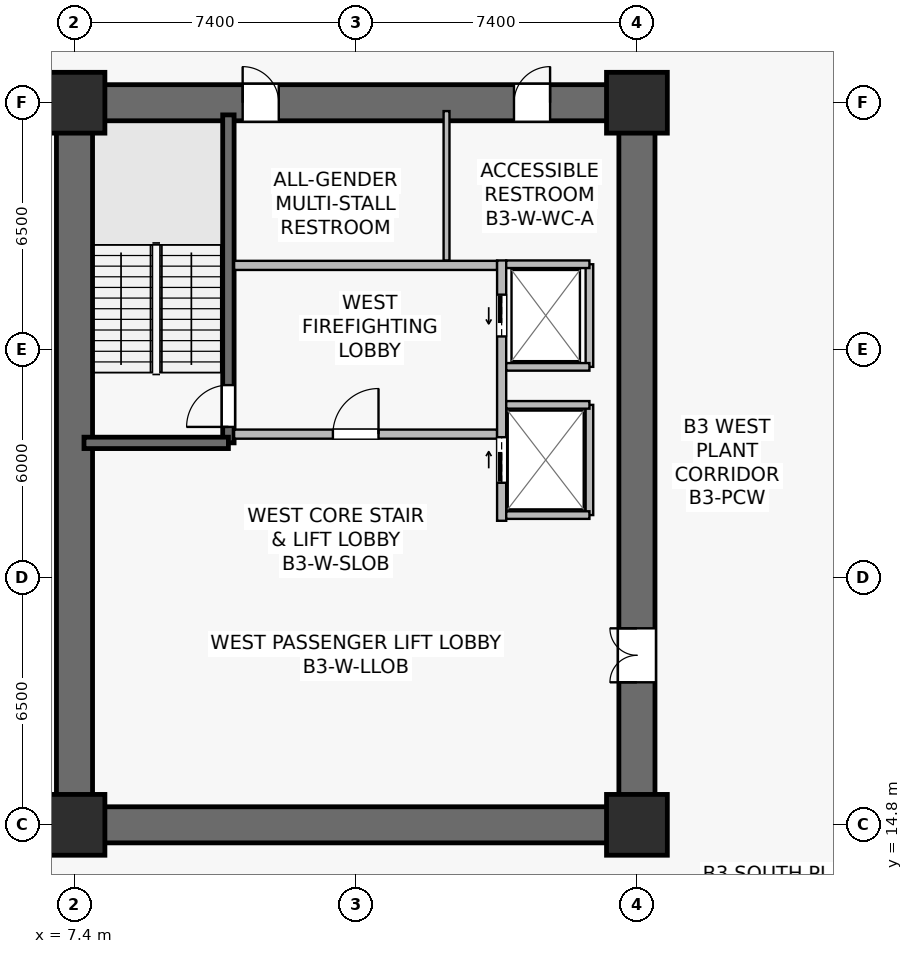
"""IFC4 building model, lengths in metres.
Left out: names, types, materials, properties, quantities, classifications, styles, units other than length and angle.
Written with IfcOpenShell. Run it as: python <this file> out.ifc"""

import sys

from ifc_helpers import new_model, si_unit, direction, frame, frame_2d, origin, origin_2d, place, context, subcontext, project, spatial, rectangle, extrude, source, transform, mapped, element, fill, save


model = new_model("IFC4")
c1 = context("Model", 3, precision=1e-05, world=origin(), true_north=direction((0.0, 1.0)))
c2 = subcontext(c1, "Body", "Model", "MODEL_VIEW")
j1 = project(units=[si_unit("LENGTHUNIT", "METRE"), si_unit("PLANEANGLEUNIT", "RADIAN")], contexts=[c1])
p1 = place(None, origin())
s1 = spatial("IfcSite", under=j1, at=p1, CompositionType="ELEMENT")
p2 = place(p1, origin())
s2 = spatial("IfcBuilding", under=s1, at=p2, CompositionType="ELEMENT")
p3 = place(p2, frame((0.0, 0.0, -14.4)))
s3 = spatial("IfcBuildingStorey", under=s2, at=p3, CompositionType="ELEMENT", Elevation=-14.4)
p4 = place(p3, frame((6.925, 14.8, 0.0), z_axis=(0.0, 0.0, 1.0), x_axis=(1.0, 0.0, 0.0)))
e1 = element("IfcWall", 1, at=p4, inside=s3, PredefinedType="SHEAR", context=c2, shape_type="SweptSolid", body=[
    extrude(rectangle(XDim=15.75, YDim=0.95, at=frame_2d((7.875, 0.0))), origin(), (0.0, 0.0, 1.0), 4.42),
])
p5 = place(p3, frame((6.925, 33.8, 0.0), z_axis=(0.0, 0.0, 1.0), x_axis=(1.0, 0.0, 0.0)))
e2 = element("IfcWall", 2, at=p5, inside=s3, PredefinedType="SHEAR", context=c2, shape_type="SweptSolid", body=[
    extrude(rectangle(XDim=15.75, YDim=0.95, at=frame_2d((7.875, 0.0))), origin(), (0.0, 0.0, 1.0), 4.42),
])
p6 = place(p5, frame((4.9, 0.0, 0.0)))
e3 = element("IfcOpeningElement", 3, at=p6, cuts=e2, PredefinedType="OPENING", context=c2, shape_type="SweptSolid", body=[
    extrude(rectangle(XDim=0.95, YDim=2.15, at=frame_2d((0.475, 1.075))), frame((0.0, 0.485, 0.0), z_axis=(0.0, -1.0, 0.0), x_axis=(1.0, 0.0, 0.0)), (0.0, 0.0, 1.0), 0.97),
])
p7 = place(p5, frame((12.04, 0.0, 0.0)))
e4 = element("IfcOpeningElement", 4, at=p7, cuts=e2, PredefinedType="OPENING", context=c2, shape_type="SweptSolid", body=[
    extrude(rectangle(XDim=0.95, YDim=2.15, at=frame_2d((0.475, 1.075))), frame((0.0, 0.485, 0.0), z_axis=(0.0, -1.0, 0.0), x_axis=(1.0, 0.0, 0.0)), (0.0, 0.0, 1.0), 0.97),
])
p8 = place(p3, frame((7.4, 15.275, 0.0), z_axis=(0.0, 0.0, 1.0), x_axis=(0.0, 1.0, 0.0)))
e5 = element("IfcWall", 5, at=p8, inside=s3, PredefinedType="SHEAR", context=c2, shape_type="SweptSolid", body=[
    extrude(rectangle(XDim=18.05, YDim=0.95, at=frame_2d((9.025, 0.0))), origin(), (0.0, 0.0, 1.0), 4.42),
])
p9 = place(p3, frame((22.2, 15.275, 0.0), z_axis=(0.0, 0.0, 1.0), x_axis=(0.0, 1.0, 0.0)))
e6 = element("IfcWall", 6, at=p9, inside=s3, PredefinedType="SHEAR", context=c2, shape_type="SweptSolid", body=[
    extrude(rectangle(XDim=18.05, YDim=0.95, at=frame_2d((9.025, 0.0))), origin(), (0.0, 0.0, 1.0), 4.42),
])
p10 = place(p9, frame((3.275, 0.0, 0.0)))
e7 = element("IfcOpeningElement", 7, at=p10, cuts=e6, PredefinedType="OPENING", context=c2, shape_type="SweptSolid", body=[
    extrude(rectangle(XDim=1.42, YDim=2.2, at=frame_2d((0.71, 1.1))), frame((0.0, 0.485, 0.0), z_axis=(0.0, -1.0, 0.0), x_axis=(1.0, 0.0, 0.0)), (0.0, 0.0, 1.0), 0.97),
])
p11 = place(p3, frame((11.45, 24.85, 0.0), z_axis=(0.0, 0.0, 1.0), x_axis=(0.0, 1.0, 0.0)))
e8 = element("IfcWall", 8, at=p11, inside=s3, PredefinedType="SHEAR", context=c2, shape_type="SweptSolid", body=[
    extrude(rectangle(XDim=8.63, YDim=0.3, at=frame_2d((4.315, 0.0))), origin(), (0.0, 0.0, 1.0), 4.42),
])
p12 = place(p11, frame((0.42, 0.0, 0.0)))
e9 = element("IfcOpeningElement", 9, at=p12, cuts=e8, PredefinedType="OPENING", context=c2, shape_type="SweptSolid", body=[
    extrude(rectangle(XDim=1.1, YDim=2.15, at=frame_2d((0.55, 1.075))), frame((0.0, 0.16, 0.0), z_axis=(0.0, -1.0, 0.0), x_axis=(1.0, 0.0, 0.0)), (0.0, 0.0, 1.0), 0.32),
])
p13 = place(p3, frame((7.65, 24.85, 0.0), z_axis=(0.0, 0.0, 1.0), x_axis=(1.0, 0.0, 0.0)))
e10 = element("IfcWall", 10, at=p13, inside=s3, PredefinedType="SHEAR", context=c2, shape_type="SweptSolid", body=[
    extrude(rectangle(XDim=3.8, YDim=0.3, at=frame_2d((1.9, 0.0))), origin(), (0.0, 0.0, 1.0), 4.42),
])
m1 = source(origin(), c2, "Body", "SweptSolid", [
    extrude(rectangle(XDim=1.6, YDim=1.6, at=origin_2d()), origin(), (0.0, 0.0, 1.0), 4.8),
])
for number, where, z_axis, x_axis in (
    (11, (7.4, 14.8, 0.0), (0.0, 0.0, 1.0), (1.0, 0.0, 0.0)),
    (12, (22.2, 14.8, 0.0), (0.0, 0.0, 1.0), (1.0, 0.0, 0.0)),
    (13, (7.4, 33.8, 0.0), (0.0, 0.0, 1.0), (1.0, 0.0, 0.0)),
    (14, (22.2, 33.8, 0.0), (0.0, 0.0, 1.0), (1.0, 0.0, 0.0)),
):
    element("IfcColumn", number, at=place(p3, frame(where, z_axis=z_axis, x_axis=x_axis)), inside=s3, PredefinedType="COLUMN", context=c2, shape_type="MappedRepresentation", body=[
        mapped(m1, transform((0.0, 0.0, 0.0), scale=1.0)),
    ])
p14 = place(p3, frame((11.6, 25.08, 0.0), z_axis=(0.0, 0.0, 1.0), x_axis=(1.0, 0.0, 0.0)))
e15 = element("IfcWall", 15, at=p14, inside=s3, PredefinedType="SOLIDWALL", context=c2, shape_type="SweptSolid", body=[
    extrude(rectangle(XDim=6.92, YDim=0.24, at=frame_2d((3.46, 0.0))), origin(), (0.0, 0.0, 1.0), 3.655),
])
p15 = place(p14, frame((2.6, 0.0, 0.0)))
e16 = element("IfcOpeningElement", 16, at=p15, cuts=e15, PredefinedType="OPENING", context=c2, shape_type="SweptSolid", body=[
    extrude(rectangle(XDim=1.2, YDim=2.16, at=frame_2d((0.6, 1.08))), frame((0.0, 0.13, 0.0), z_axis=(0.0, -1.0, 0.0), x_axis=(1.0, 0.0, 0.0)), (0.0, 0.0, 1.0), 0.26),
])
p16 = place(p3, frame((11.6, 29.52, 0.0), z_axis=(0.0, 0.0, 1.0), x_axis=(1.0, 0.0, 0.0)))
e17 = element("IfcWall", 17, at=p16, inside=s3, PredefinedType="SOLIDWALL", context=c2, shape_type="SweptSolid", body=[
    extrude(rectangle(XDim=6.92, YDim=0.24, at=frame_2d((3.46, 0.0))), origin(), (0.0, 0.0, 1.0), 3.655),
])
p17 = place(p3, frame((18.64, 22.8, 0.0), z_axis=(0.0, 0.0, 1.0), x_axis=(0.0, 1.0, 0.0)))
e18 = element("IfcWall", 18, at=p17, inside=s3, PredefinedType="SOLIDWALL", context=c2, shape_type="SweptSolid", body=[
    extrude(rectangle(XDim=6.85, YDim=0.24, at=frame_2d((3.425, 0.0))), origin(), (0.0, 0.0, 1.0), 3.505),
])
p18 = place(p17, frame((4.85, 0.0, 0.0)))
e19 = element("IfcOpeningElement", 19, at=p18, cuts=e18, PredefinedType="OPENING", context=c2, shape_type="SweptSolid", body=[
    extrude(rectangle(XDim=1.1, YDim=2.22, at=frame_2d((0.55, 1.11))), frame((0.0, 0.13, 0.0), z_axis=(0.0, -1.0, 0.0), x_axis=(1.0, 0.0, 0.0)), (0.0, 0.0, 1.0), 0.26),
])
p19 = place(p17, frame((1.0, 0.0, 0.0)))
e20 = element("IfcOpeningElement", 20, at=p19, cuts=e18, PredefinedType="OPENING", context=c2, shape_type="SweptSolid", body=[
    extrude(rectangle(XDim=1.2, YDim=2.22, at=frame_2d((0.6, 1.11))), frame((0.0, 0.13, 0.0), z_axis=(0.0, -1.0, 0.0), x_axis=(1.0, 0.0, 0.0)), (0.0, 0.0, 1.0), 0.26),
])
p20 = place(p3, frame((20.95, 26.85, 0.0), z_axis=(0.0, 0.0, 1.0), x_axis=(0.0, 1.0, 0.0)))
e21 = element("IfcWall", 21, at=p20, inside=s3, PredefinedType="SOLIDWALL", context=c2, shape_type="SweptSolid", body=[
    extrude(rectangle(XDim=2.7, YDim=0.2, at=frame_2d((1.35, 0.0))), origin(), (0.0, 0.0, 1.0), 4.42),
])
p21 = place(p3, frame((18.76, 29.55, 0.0), z_axis=(0.0, 0.0, 1.0), x_axis=(1.0, 0.0, 0.0)))
e22 = element("IfcWall", 22, at=p21, inside=s3, PredefinedType="SOLIDWALL", context=c2, shape_type="SweptSolid", body=[
    extrude(rectangle(XDim=2.19, YDim=0.2, at=frame_2d((1.095, 0.0))), origin(), (0.0, 0.0, 1.0), 4.42),
])
p22 = place(p3, frame((18.76, 26.85, 0.0), z_axis=(0.0, 0.0, 1.0), x_axis=(1.0, 0.0, 0.0)))
e23 = element("IfcWall", 23, at=p22, inside=s3, PredefinedType="SOLIDWALL", context=c2, shape_type="SweptSolid", body=[
    extrude(rectangle(XDim=2.19, YDim=0.2, at=frame_2d((1.095, 0.0))), origin(), (0.0, 0.0, 1.0), 3.817),
])
p23 = place(p3, frame((20.95, 22.95, 0.0), z_axis=(0.0, 0.0, 1.0), x_axis=(0.0, 1.0, 0.0)))
e24 = element("IfcWall", 24, at=p23, inside=s3, PredefinedType="SOLIDWALL", context=c2, shape_type="SweptSolid", body=[
    extrude(rectangle(XDim=2.9, YDim=0.2, at=frame_2d((1.45, 0.0))), origin(), (0.0, 0.0, 1.0), 3.505),
])
for number, where, z_axis, x_axis in (
    (25, (18.76, 25.85, 0.0), (0.0, 0.0, 1.0), (1.0, 0.0, 0.0)),
    (26, (18.76, 22.95, 0.0), (0.0, 0.0, 1.0), (1.0, 0.0, 0.0)),
):
    element("IfcWall", number, at=place(p3, frame(where, z_axis=z_axis, x_axis=x_axis)), inside=s3, PredefinedType="SOLIDWALL", context=c2, shape_type="SweptSolid", body=[
        extrude(rectangle(XDim=2.19, YDim=0.2, at=frame_2d((1.095, 0.0))), origin(), (0.0, 0.0, 1.0), 4.42),
    ])
p24 = place(p3, frame((17.19, 29.65, 0.0), z_axis=(0.0, 0.0, 1.0), x_axis=(0.0, 1.0, 0.0)))
e27 = element("IfcWall", 27, at=p24, inside=s3, PredefinedType="PLUMBINGWALL", context=c2, shape_type="SweptSolid", body=[
    extrude(rectangle(XDim=3.93, YDim=0.155, at=frame_2d((1.965, 0.0))), origin(), (0.0, 0.0, 1.0), 4.42),
])
m2 = source(origin(), c2, "Body", "SweptSolid", [
    extrude(rectangle(XDim=1.1, YDim=2.15, at=frame_2d((0.55, 1.075))), frame((0.0, 0.025, 0.0), z_axis=(0.0, -1.0, 0.0), x_axis=(1.0, 0.0, 0.0)), (0.0, 0.0, 1.0), 0.05),
])
p25 = place(p12, origin())
e28 = element("IfcDoor", 28, at=p25, inside=s3, OperationType="SINGLE_SWING_LEFT", PredefinedType="DOOR", context=c2, shape_type="MappedRepresentation", body=[
    mapped(m2, transform((0.0, 0.0, 0.0), scale=1.0)),
])
fill(e9, e28)
m3 = source(origin(), c2, "Body", "SweptSolid", [
    extrude(rectangle(XDim=1.2, YDim=2.16, at=frame_2d((0.6, 1.08))), frame((0.0, 0.025, 0.0), z_axis=(0.0, -1.0, 0.0), x_axis=(1.0, 0.0, 0.0)), (0.0, 0.0, 1.0), 0.05),
])
p26 = place(p15, origin())
e29 = element("IfcDoor", 29, at=p26, inside=s3, OperationType="SINGLE_SWING_RIGHT", PredefinedType="DOOR", context=c2, shape_type="MappedRepresentation", body=[
    mapped(m3, transform((0.0, 0.0, 0.0), scale=1.0)),
])
fill(e16, e29)
m4 = source(origin(), c2, "Body", "SweptSolid", [
    extrude(rectangle(XDim=1.1, YDim=2.22, at=frame_2d((0.55, 1.11))), frame((0.0, 0.025, 0.0), z_axis=(0.0, -1.0, 0.0), x_axis=(1.0, 0.0, 0.0)), (0.0, 0.0, 1.0), 0.05),
])
p27 = place(p18, origin())
e30 = element("IfcDoor", 30, at=p27, inside=s3, OperationType="SLIDING_TO_LEFT", PredefinedType="USERDEFINED", context=c2, shape_type="MappedRepresentation", body=[
    mapped(m4, transform((0.0, 0.0, 0.0), scale=1.0)),
])
fill(e19, e30)
m5 = source(origin(), c2, "Body", "SweptSolid", [
    extrude(rectangle(XDim=1.2, YDim=2.22, at=frame_2d((0.6, 1.11))), frame((0.0, 0.025, 0.0), z_axis=(0.0, -1.0, 0.0), x_axis=(1.0, 0.0, 0.0)), (0.0, 0.0, 1.0), 0.05),
])
p28 = place(p19, origin())
e31 = element("IfcDoor", 31, at=p28, inside=s3, OperationType="SLIDING_TO_RIGHT", PredefinedType="USERDEFINED", context=c2, shape_type="MappedRepresentation", body=[
    mapped(m5, transform((0.0, 0.0, 0.0), scale=1.0)),
])
fill(e20, e31)
m6 = source(origin(), c2, "Body", "SweptSolid", [
    extrude(rectangle(XDim=1.42, YDim=2.2, at=frame_2d((0.71, 1.1))), frame((0.0, 0.025, 0.0), z_axis=(0.0, -1.0, 0.0), x_axis=(1.0, 0.0, 0.0)), (0.0, 0.0, 1.0), 0.05),
])
p29 = place(p10, origin())
e32 = element("IfcDoor", 32, at=p29, inside=s3, OperationType="DOUBLE_DOOR_SINGLE_SWING", PredefinedType="DOOR", context=c2, shape_type="MappedRepresentation", body=[
    mapped(m6, transform((0.0, 0.0, 0.0), scale=1.0)),
])
fill(e7, e32)
m7 = source(origin(), c2, "Body", "SweptSolid", [
    extrude(rectangle(XDim=0.95, YDim=2.15, at=frame_2d((0.475, 1.075))), frame((0.0, 0.025, 0.0), z_axis=(0.0, -1.0, 0.0), x_axis=(1.0, 0.0, 0.0)), (0.0, 0.0, 1.0), 0.05),
])
p30 = place(p6, origin())
e33 = element("IfcDoor", 33, at=p30, inside=s3, OperationType="SINGLE_SWING_LEFT", PredefinedType="DOOR", context=c2, shape_type="MappedRepresentation", body=[
    mapped(m7, transform((0.0, 0.0, 0.0), scale=1.0)),
])
fill(e3, e33)
p31 = place(p7, origin())
e34 = element("IfcDoor", 34, at=p31, inside=s3, OperationType="SINGLE_SWING_RIGHT", PredefinedType="DOOR", context=c2, shape_type="MappedRepresentation", body=[
    mapped(m7, transform((0.0, 0.0, 0.0), scale=1.0)),
])
fill(e4, e34)
save(model, sys.argv[1])
